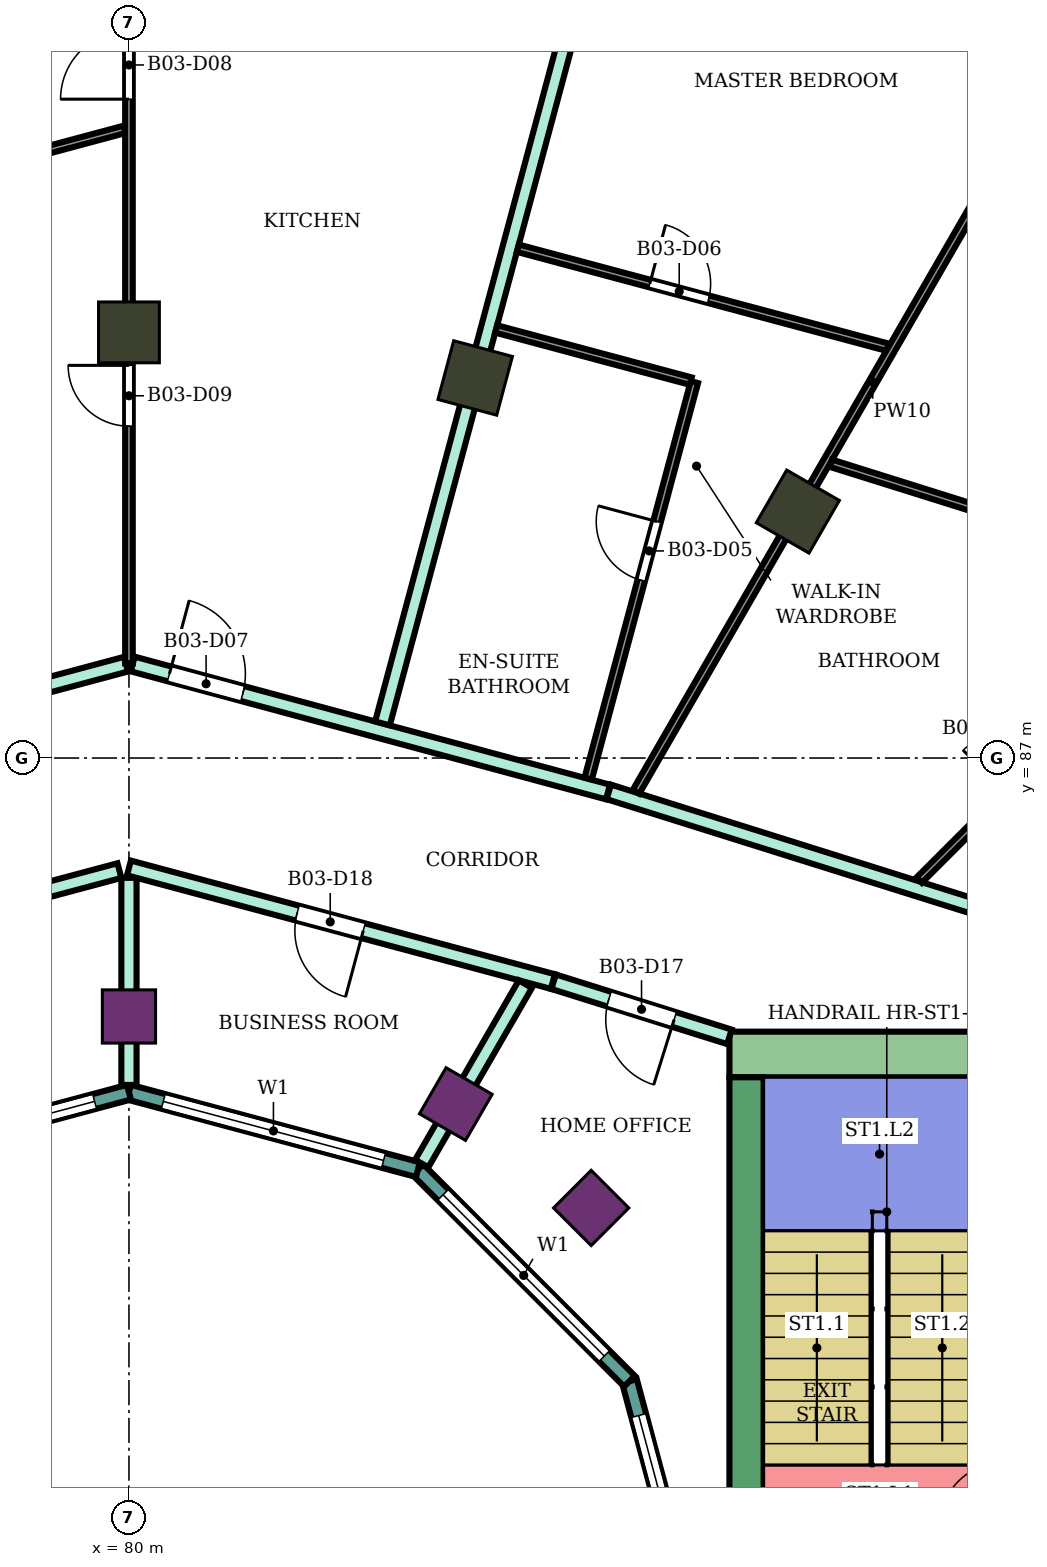
"""IFC4 building model, lengths in metres.
Left out: names, types, materials, properties, quantities, classifications, styles, units other than length and angle.
Written with IfcOpenShell. Run it as: python <this file> out.ifc"""

import sys

from ifc_helpers import new_model, si_unit, direction, frame, frame_2d, origin, origin_2d, place, context, subcontext, project, spatial, rectangle, extrude, element, fill, save


model = new_model("IFC4")
c1 = context("Model", 3, precision=1e-05, world=origin(), true_north=direction((0.0, 1.0)))
c2 = subcontext(c1, "Body", "Model", "MODEL_VIEW")
j1 = project(units=[si_unit("LENGTHUNIT", "METRE"), si_unit("PLANEANGLEUNIT", "RADIAN")], contexts=[c1])
p1 = place(None, origin())
s1 = spatial("IfcSite", under=j1, at=p1, CompositionType="ELEMENT")
p2 = place(p1, origin())
s2 = spatial("IfcBuilding", under=s1, at=p2, CompositionType="ELEMENT")
p3 = place(p2, frame((0.0, 0.0, 241.5)))
s3 = spatial("IfcBuildingStorey", under=s2, at=p3, CompositionType="ELEMENT", Elevation=241.5)
for number, where, z_axis, x_axis in (
    (1, (88.8, 90.242, 0.0), (0.0, 0.0, 1.0), (0.5, 0.866, 0.0)),
    (2, (84.555, 92.0, 0.0), (0.0, 0.0, 1.0), (0.259, 0.966, 0.0)),
    (3, (80.0, 92.6, 0.0), (0.0, 0.0, 1.0), (0.0, 1.0, 0.0)),
):
    element("IfcColumn", number, at=place(p3, frame(where, z_axis=z_axis, x_axis=x_axis)), inside=s3, PredefinedType="COLUMN", context=c2, shape_type="SweptSolid", body=[
        extrude(rectangle(XDim=0.8, YDim=0.8, at=origin_2d()), origin(), (0.0, 0.0, 1.0), 4.2),
    ])
for number, where, z_axis, x_axis in (
    (4, (86.081, 81.081, 0.0), (0.0, 0.0, 1.0), (0.707, 0.707, 0.0)),
    (5, (84.3, 82.448, 0.0), (0.0, 0.0, 1.0), (0.5, 0.866, 0.0)),
    (6, (80.0, 83.6, 0.0), (0.0, 0.0, 1.0), (0.0, 1.0, 0.0)),
):
    element("IfcColumn", number, at=place(p3, frame(where, z_axis=z_axis, x_axis=x_axis)), inside=s3, PredefinedType="COLUMN", context=c2, shape_type="SweptSolid", body=[
        extrude(rectangle(XDim=0.7, YDim=0.7, at=origin_2d()), origin(), (0.0, 0.0, 1.0), 4.2),
    ])
p4 = place(p3, frame((87.9, 83.1, 0.0), z_axis=(0.0, 0.0, 1.0), x_axis=(1.0, 0.0, 0.0)))
e7 = element("IfcWall", 7, at=p4, inside=s3, PredefinedType="SHEAR", context=c2, shape_type="SweptSolid", body=[
    extrude(rectangle(XDim=14.9, YDim=0.6, at=frame_2d((7.45, 0.0))), origin(), (0.0, 0.0, 1.0), 3.88),
])
p5 = place(p4, frame((4.2, 0.0, 0.0)))
e8 = element("IfcOpeningElement", 8, at=p5, cuts=e7, PredefinedType="OPENING", context=c2, shape_type="SweptSolid", body=[
    extrude(rectangle(XDim=2.4, YDim=2.4, at=frame_2d((1.2, 1.2))), frame((0.0, 0.31, 0.0), z_axis=(0.0, -1.0, 0.0), x_axis=(1.0, 0.0, 0.0)), (0.0, 0.0, 1.0), 0.62),
])
p6 = place(p3, frame((88.125, 75.0, 0.0), z_axis=(0.0, 0.0, 1.0), x_axis=(0.0, 1.0, 0.0)))
e9 = element("IfcWall", 9, at=p6, inside=s3, PredefinedType="SHEAR", context=c2, shape_type="SweptSolid", body=[
    extrude(rectangle(XDim=7.8, YDim=0.45, at=frame_2d((3.9, 0.0))), origin(), (0.0, 0.0, 1.0), 3.88),
])
p7 = place(p3, frame((87.604, 75.0, 0.0), z_axis=(0.0, 0.0, 1.0), x_axis=(-0.258789828301, 0.965933654434, 0.0)))
e10 = element("IfcWall", 10, at=p7, inside=s3, PredefinedType="NOTDEFINED", context=c2, shape_type="SweptSolid", body=[
    extrude(rectangle(XDim=3.936, YDim=0.2, at=frame_2d((1.968, 0.0))), origin(), (0.0, 0.0, 1.0), 4.2),
])
p8 = place(p7, frame((0.468, 0.0, 0.9)))
e11 = element("IfcOpeningElement", 11, at=p8, cuts=e10, PredefinedType="OPENING", context=c2, shape_type="SweptSolid", body=[
    extrude(rectangle(XDim=3.0, YDim=2.3, at=frame_2d((1.5, 1.15))), frame((0.0, 0.11, 0.0), z_axis=(0.0, -1.0, 0.0), x_axis=(1.0, 0.0, 0.0)), (0.0, 0.0, 1.0), 0.22),
])
p9 = place(p3, frame((86.585, 78.802, 0.0), z_axis=(0.0, 0.0, 1.0), x_axis=(-0.707106781187, 0.707106781187, 0.0)))
e12 = element("IfcWall", 12, at=p9, inside=s3, PredefinedType="NOTDEFINED", context=c2, shape_type="SweptSolid", body=[
    extrude(rectangle(XDim=3.936, YDim=0.2, at=frame_2d((1.968, 0.0))), origin(), (0.0, 0.0, 1.0), 4.2),
])
p10 = place(p9, frame((0.468, 0.0, 0.9)))
e13 = element("IfcOpeningElement", 13, at=p10, cuts=e12, PredefinedType="OPENING", context=c2, shape_type="SweptSolid", body=[
    extrude(rectangle(XDim=3.0, YDim=2.3, at=frame_2d((1.5, 1.15))), frame((0.0, 0.11, 0.0), z_axis=(0.0, -1.0, 0.0), x_axis=(1.0, 0.0, 0.0)), (0.0, 0.0, 1.0), 0.22),
])
p11 = place(p3, frame((83.802, 81.585, 0.0), z_axis=(0.0, 0.0, 1.0), x_axis=(-0.965933654434, 0.258789828301, 0.0)))
e14 = element("IfcWall", 14, at=p11, inside=s3, PredefinedType="NOTDEFINED", context=c2, shape_type="SweptSolid", body=[
    extrude(rectangle(XDim=3.936, YDim=0.2, at=frame_2d((1.968, 0.0))), origin(), (0.0, 0.0, 1.0), 4.2),
])
p12 = place(p11, frame((0.468, 0.0, 0.9)))
e15 = element("IfcOpeningElement", 15, at=p12, cuts=e14, PredefinedType="OPENING", context=c2, shape_type="SweptSolid", body=[
    extrude(rectangle(XDim=3.0, YDim=2.3, at=frame_2d((1.5, 1.15))), frame((0.0, 0.11, 0.0), z_axis=(0.0, -1.0, 0.0), x_axis=(1.0, 0.0, 0.0)), (0.0, 0.0, 1.0), 0.22),
])
p13 = place(p3, frame((80.0, 82.604, 0.0), z_axis=(0.0, 0.0, 1.0), x_axis=(-0.965933654434, -0.258789828301, 0.0)))
e16 = element("IfcWall", 16, at=p13, inside=s3, PredefinedType="NOTDEFINED", context=c2, shape_type="SweptSolid", body=[
    extrude(rectangle(XDim=3.936, YDim=0.2, at=frame_2d((1.968, 0.0))), origin(), (0.0, 0.0, 1.0), 4.2),
])
p14 = place(p13, frame((0.468, 0.0, 0.9)))
e17 = element("IfcOpeningElement", 17, at=p14, cuts=e16, PredefinedType="OPENING", context=c2, shape_type="SweptSolid", body=[
    extrude(rectangle(XDim=3.0, YDim=2.3, at=frame_2d((1.5, 1.15))), frame((0.0, 0.11, 0.0), z_axis=(0.0, -1.0, 0.0), x_axis=(1.0, 0.0, 0.0)), (0.0, 0.0, 1.0), 0.22),
])
p15 = place(p3, frame((73.687, 86.554, 0.0), z_axis=(0.0, 0.0, 1.0), x_axis=(0.96595928904, 0.258694128106, 0.0)))
e18 = element("IfcWall", 18, at=p15, inside=s3, PredefinedType="PARTITIONING", context=c2, shape_type="SweptSolid", body=[
    extrude(rectangle(XDim=6.496, YDim=0.2, at=frame_2d((3.248, 0.0))), origin(), (0.0, 0.0, 1.0), 3.75),
])
p16 = place(p15, frame((0.55, 0.0, 0.0)))
e19 = element("IfcOpeningElement", 19, at=p16, cuts=e18, PredefinedType="OPENING", context=c2, shape_type="SweptSolid", body=[
    extrude(rectangle(XDim=1.0, YDim=2.1, at=frame_2d((0.5, 1.05))), frame((0.0, 0.11, 0.0), z_axis=(0.0, -1.0, 0.0), x_axis=(1.0, 0.0, 0.0)), (0.0, 0.0, 1.0), 0.22),
])
p17 = place(p3, frame((74.413, 84.057, 0.0), z_axis=(0.0, 0.0, 1.0), x_axis=(0.965972135939, 0.258646153246, 0.0)))
e20 = element("IfcWall", 20, at=p17, inside=s3, PredefinedType="PARTITIONING", context=c2, shape_type="SweptSolid", body=[
    extrude(rectangle(XDim=5.654, YDim=0.2, at=frame_2d((2.827, 0.0))), origin(), (0.0, 0.0, 1.0), 3.75),
])
p18 = place(p17, frame((2.593, 0.0, 0.0)))
e21 = element("IfcOpeningElement", 21, at=p18, cuts=e20, PredefinedType="OPENING", context=c2, shape_type="SweptSolid", body=[
    extrude(rectangle(XDim=0.9, YDim=2.1, at=frame_2d((0.45, 1.05))), frame((0.0, 0.11, 0.0), z_axis=(0.0, -1.0, 0.0), x_axis=(1.0, 0.0, 0.0)), (0.0, 0.0, 1.0), 0.22),
])
p19 = place(p3, frame((80.0, 82.699, 0.0), z_axis=(0.0, 0.0, 1.0), x_axis=(0.0, 1.0, 0.0)))
e22 = element("IfcWall", 22, at=p19, inside=s3, PredefinedType="PARTITIONING", context=c2, shape_type="SweptSolid", body=[
    extrude(rectangle(XDim=2.725, YDim=0.2, at=frame_2d((1.363, 0.0))), origin(), (0.0, 0.0, 1.0), 3.75),
])
p20 = place(p3, frame((80.0, 85.554, 0.0), z_axis=(0.0, 0.0, 1.0), x_axis=(0.965928989968, -0.258807237802, 0.0)))
e23 = element("IfcWall", 23, at=p20, inside=s3, PredefinedType="PARTITIONING", context=c2, shape_type="SweptSolid", body=[
    extrude(rectangle(XDim=5.774, YDim=0.2, at=frame_2d((2.887, 0.0))), origin(), (0.0, 0.0, 1.0), 3.75),
])
p21 = place(p20, frame((2.292, 0.0, 0.0)))
e24 = element("IfcOpeningElement", 24, at=p21, cuts=e23, PredefinedType="OPENING", context=c2, shape_type="SweptSolid", body=[
    extrude(rectangle(XDim=0.9, YDim=2.1, at=frame_2d((0.45, 1.05))), frame((0.0, 0.11, 0.0), z_axis=(0.0, -1.0, 0.0), x_axis=(1.0, 0.0, 0.0)), (0.0, 0.0, 1.0), 0.22),
])
p22 = place(p3, frame((80.049, 88.237, 0.0), z_axis=(0.0, 0.0, 1.0), x_axis=(0.965582990495, -0.260095152718, 0.0)))
e25 = element("IfcWall", 25, at=p22, inside=s3, PredefinedType="PARTITIONING", context=c2, shape_type="SweptSolid", body=[
    extrude(rectangle(XDim=6.476, YDim=0.2, at=frame_2d((3.238, 0.0))), origin(), (0.0, 0.0, 1.0), 3.75),
])
p23 = place(p22, frame((0.5, 0.0, 0.0)))
e26 = element("IfcOpeningElement", 26, at=p23, cuts=e25, PredefinedType="OPENING", context=c2, shape_type="SweptSolid", body=[
    extrude(rectangle(XDim=1.0, YDim=2.1, at=frame_2d((0.5, 1.05))), frame((0.0, 0.11, 0.0), z_axis=(0.0, -1.0, 0.0), x_axis=(1.0, 0.0, 0.0)), (0.0, 0.0, 1.0), 0.22),
])
p24 = place(p3, frame((83.335, 87.456, 0.0), z_axis=(0.0, 0.0, 1.0), x_axis=(0.259184958139, 0.965827705895, 0.0)))
e27 = element("IfcWall", 27, at=p24, inside=s3, PredefinedType="PARTITIONING", context=c2, shape_type="SweptSolid", body=[
    extrude(rectangle(XDim=12.904, YDim=0.2, at=frame_2d((6.452, 0.0))), origin(), (0.0, 0.0, 1.0), 3.75),
])
p25 = place(p3, frame((83.852, 81.665, 0.0), z_axis=(0.0, 0.0, 1.0), x_axis=(0.500185068774, 0.865918527909, 0.0)))
e28 = element("IfcWall", 28, at=p25, inside=s3, PredefinedType="PARTITIONING", context=c2, shape_type="SweptSolid", body=[
    extrude(rectangle(XDim=2.726, YDim=0.2, at=frame_2d((1.363, 0.0))), origin(), (0.0, 0.0, 1.0), 3.75),
])
p26 = place(p3, frame((85.587, 84.057, 0.0), z_axis=(0.0, 0.0, 1.0), x_axis=(0.954239513179, -0.299043393987, 0.0)))
e29 = element("IfcWall", 29, at=p26, inside=s3, PredefinedType="PARTITIONING", context=c2, shape_type="SweptSolid", body=[
    extrude(rectangle(XDim=2.424, YDim=0.2, at=frame_2d((1.212, 0.0))), origin(), (0.0, 0.0, 1.0), 3.75),
])
p27 = place(p26, frame((0.762, 0.0, 0.0)))
e30 = element("IfcOpeningElement", 30, at=p27, cuts=e29, PredefinedType="OPENING", context=c2, shape_type="SweptSolid", body=[
    extrude(rectangle(XDim=0.9, YDim=2.1, at=frame_2d((0.45, 1.05))), frame((0.0, 0.11, 0.0), z_axis=(0.0, -1.0, 0.0), x_axis=(1.0, 0.0, 0.0)), (0.0, 0.0, 1.0), 0.22),
])
p28 = place(p3, frame((86.313, 86.554, 0.0), z_axis=(0.0, 0.0, 1.0), x_axis=(0.954081217458, -0.299548043717, 0.0)))
e31 = element("IfcWall", 31, at=p28, inside=s3, PredefinedType="PARTITIONING", context=c2, shape_type="SweptSolid", body=[
    extrude(rectangle(XDim=5.721, YDim=0.2, at=frame_2d((2.86, 0.0))), origin(), (0.0, 0.0, 1.0), 3.75),
])
p29 = place(p3, frame((75.035, 93.955, 0.0), z_axis=(0.0, 0.0, 1.0), x_axis=(0.965868648254, 0.259032342228, 0.0)))
e32 = element("IfcWall", 32, at=p29, inside=s3, PredefinedType="PARTITIONING", context=c2, shape_type="SweptSolid", body=[
    extrude(rectangle(XDim=5.08, YDim=0.1, at=frame_2d((2.54, 0.0))), origin(), (0.0, 0.0, 1.0), 3.75),
])
p30 = place(p3, frame((80.0, 88.246, 0.0), z_axis=(0.0, 0.0, 1.0), x_axis=(0.0, 1.0, 0.0)))
e33 = element("IfcWall", 33, at=p30, inside=s3, PredefinedType="PARTITIONING", context=c2, shape_type="SweptSolid", body=[
    extrude(rectangle(XDim=9.954, YDim=0.1, at=frame_2d((4.977, 0.0))), origin(), (0.0, 0.0, 1.0), 3.75),
])
p31 = place(p30, frame((7.422, 0.0, 0.0)))
e34 = element("IfcOpeningElement", 34, at=p31, cuts=e33, PredefinedType="OPENING", context=c2, shape_type="SweptSolid", body=[
    extrude(rectangle(XDim=0.9, YDim=2.1, at=frame_2d((0.45, 1.05))), frame((0.0, 0.06, 0.0), z_axis=(0.0, -1.0, 0.0), x_axis=(1.0, 0.0, 0.0)), (0.0, 0.0, 1.0), 0.12),
])
p32 = place(p30, frame((3.12, 0.0, 0.0)))
e35 = element("IfcOpeningElement", 35, at=p32, cuts=e33, PredefinedType="OPENING", context=c2, shape_type="SweptSolid", body=[
    extrude(rectangle(XDim=0.8, YDim=2.1, at=frame_2d((0.4, 1.05))), frame((0.0, 0.06, 0.0), z_axis=(0.0, -1.0, 0.0), x_axis=(1.0, 0.0, 0.0)), (0.0, 0.0, 1.0), 0.12),
])
p33 = place(p3, frame((84.831, 92.645, 0.0), z_axis=(0.0, 0.0, 1.0), x_axis=(0.965900745566, -0.258912629499, 0.0)))
e36 = element("IfcWall", 36, at=p33, inside=s3, PredefinedType="PARTITIONING", context=c2, shape_type="SweptSolid", body=[
    extrude(rectangle(XDim=2.65, YDim=0.1, at=frame_2d((1.325, 0.0))), origin(), (0.0, 0.0, 1.0), 3.75),
])
p34 = place(p3, frame((85.116, 93.707, 0.0), z_axis=(0.0, 0.0, 1.0), x_axis=(0.965979414561, -0.258618968068, 0.0)))
e37 = element("IfcWall", 37, at=p34, inside=s3, PredefinedType="PARTITIONING", context=c2, shape_type="SweptSolid", body=[
    extrude(rectangle(XDim=5.036, YDim=0.1, at=frame_2d((2.518, 0.0))), origin(), (0.0, 0.0, 1.0), 3.75),
])
p35 = place(p34, frame((1.798, 0.0, 0.0)))
e38 = element("IfcOpeningElement", 38, at=p35, cuts=e37, PredefinedType="OPENING", context=c2, shape_type="SweptSolid", body=[
    extrude(rectangle(XDim=0.8, YDim=2.1, at=frame_2d((0.4, 1.05))), frame((0.0, 0.06, 0.0), z_axis=(0.0, -1.0, 0.0), x_axis=(1.0, 0.0, 0.0)), (0.0, 0.0, 1.0), 0.12),
])
p36 = place(p3, frame((86.042, 86.731, 0.0), z_axis=(0.0, 0.0, 1.0), x_axis=(0.258737592043, 0.96594764789, 0.0)))
e39 = element("IfcWall", 39, at=p36, inside=s3, PredefinedType="PARTITIONING", context=c2, shape_type="SweptSolid", body=[
    extrude(rectangle(XDim=5.399, YDim=0.1, at=frame_2d((2.7, 0.0))), origin(), (0.0, 0.0, 1.0), 3.75),
])
p37 = place(p36, frame((2.7, 0.0, 0.0)))
e40 = element("IfcOpeningElement", 40, at=p37, cuts=e39, PredefinedType="OPENING", context=c2, shape_type="SweptSolid", body=[
    extrude(rectangle(XDim=0.8, YDim=2.1, at=frame_2d((0.4, 1.05))), frame((0.0, 0.06, 0.0), z_axis=(0.0, -1.0, 0.0), x_axis=(1.0, 0.0, 0.0)), (0.0, 0.0, 1.0), 0.12),
])
p38 = place(p3, frame((86.671, 86.554, 0.0), z_axis=(0.0, 0.0, 1.0), x_axis=(0.500104188531, 0.865965242151, 0.0)))
e41 = element("IfcWall", 41, at=p38, inside=s3, PredefinedType="PARTITIONING", context=c2, shape_type="SweptSolid", body=[
    extrude(rectangle(XDim=12.456, YDim=0.1, at=frame_2d((6.228, 0.0))), origin(), (0.0, 0.0, 1.0), 3.75),
])
p39 = place(p38, frame((9.111, 0.0, 0.0)))
e42 = element("IfcOpeningElement", 42, at=p39, cuts=e41, PredefinedType="OPENING", context=c2, shape_type="SweptSolid", body=[
    extrude(rectangle(XDim=0.9, YDim=2.1, at=frame_2d((0.45, 1.05))), frame((0.0, 0.06, 0.0), z_axis=(0.0, -1.0, 0.0), x_axis=(1.0, 0.0, 0.0)), (0.0, 0.0, 1.0), 0.12),
])
p40 = place(p3, frame((89.235, 90.878, 0.0), z_axis=(0.0, 0.0, 1.0), x_axis=(0.954193795587, -0.299189238548, 0.0)))
e43 = element("IfcWall", 43, at=p40, inside=s3, PredefinedType="PARTITIONING", context=c2, shape_type="SweptSolid", body=[
    extrude(rectangle(XDim=5.23, YDim=0.1, at=frame_2d((2.615, 0.0))), origin(), (0.0, 0.0, 1.0), 3.75),
])
p41 = place(p3, frame((90.396, 85.393, 0.0), z_axis=(0.0, 0.0, 1.0), x_axis=(0.707279106146, 0.706934414221, 0.0)))
e44 = element("IfcWall", 44, at=p41, inside=s3, PredefinedType="PARTITIONING", context=c2, shape_type="SweptSolid", body=[
    extrude(rectangle(XDim=8.5, YDim=0.1, at=frame_2d((4.25, 0.0))), origin(), (0.0, 0.0, 1.0), 3.75),
])
p42 = place(p41, frame((5.919, 0.0, 0.0)))
e45 = element("IfcOpeningElement", 45, at=p42, cuts=e44, PredefinedType="OPENING", context=c2, shape_type="SweptSolid", body=[
    extrude(rectangle(XDim=0.9, YDim=2.1, at=frame_2d((0.45, 1.05))), frame((0.0, 0.06, 0.0), z_axis=(0.0, -1.0, 0.0), x_axis=(1.0, 0.0, 0.0)), (0.0, 0.0, 1.0), 0.12),
])
p43 = place(p41, frame((1.617, 0.0, 0.0)))
e46 = element("IfcOpeningElement", 46, at=p43, cuts=e44, PredefinedType="OPENING", context=c2, shape_type="SweptSolid", body=[
    extrude(rectangle(XDim=0.8, YDim=2.1, at=frame_2d((0.4, 1.05))), frame((0.0, 0.06, 0.0), z_axis=(0.0, -1.0, 0.0), x_axis=(1.0, 0.0, 0.0)), (0.0, 0.0, 1.0), 0.12),
])
p44 = place(p8, origin())
e47 = element("IfcWindow", 47, at=p44, inside=s3, PartitioningType="SINGLE_PANEL", PredefinedType="WINDOW", context=c2, shape_type="SweptSolid", body=[
    extrude(rectangle(XDim=3.0, YDim=2.3, at=frame_2d((1.5, 1.15))), frame((0.0, 0.03, 0.0), z_axis=(0.0, -1.0, 0.0), x_axis=(1.0, 0.0, 0.0)), (0.0, 0.0, 1.0), 0.06),
])
fill(e11, e47)
p45 = place(p10, origin())
e48 = element("IfcWindow", 48, at=p45, inside=s3, PartitioningType="SINGLE_PANEL", PredefinedType="WINDOW", context=c2, shape_type="SweptSolid", body=[
    extrude(rectangle(XDim=3.0, YDim=2.3, at=frame_2d((1.5, 1.15))), frame((0.0, 0.03, 0.0), z_axis=(0.0, -1.0, 0.0), x_axis=(1.0, 0.0, 0.0)), (0.0, 0.0, 1.0), 0.06),
])
fill(e13, e48)
p46 = place(p12, origin())
e49 = element("IfcWindow", 49, at=p46, inside=s3, PartitioningType="SINGLE_PANEL", PredefinedType="WINDOW", context=c2, shape_type="SweptSolid", body=[
    extrude(rectangle(XDim=3.0, YDim=2.3, at=frame_2d((1.5, 1.15))), frame((0.0, 0.03, 0.0), z_axis=(0.0, -1.0, 0.0), x_axis=(1.0, 0.0, 0.0)), (0.0, 0.0, 1.0), 0.06),
])
fill(e15, e49)
p47 = place(p14, origin())
e50 = element("IfcWindow", 50, at=p47, inside=s3, PartitioningType="SINGLE_PANEL", PredefinedType="WINDOW", context=c2, shape_type="SweptSolid", body=[
    extrude(rectangle(XDim=3.0, YDim=2.3, at=frame_2d((1.5, 1.15))), frame((0.0, 0.03, 0.0), z_axis=(0.0, -1.0, 0.0), x_axis=(1.0, 0.0, 0.0)), (0.0, 0.0, 1.0), 0.06),
])
fill(e17, e50)
p48 = place(p37, origin())
e51 = element("IfcDoor", 51, at=p48, inside=s3, OperationType="SINGLE_SWING_RIGHT", PredefinedType="DOOR", context=c2, shape_type="SweptSolid", body=[
    extrude(rectangle(XDim=0.8, YDim=2.1, at=frame_2d((0.4, 1.05))), frame((0.0, 0.025, 0.0), z_axis=(0.0, -1.0, 0.0), x_axis=(1.0, 0.0, 0.0)), (0.0, 0.0, 1.0), 0.05),
])
fill(e40, e51)
p49 = place(p35, origin())
e52 = element("IfcDoor", 52, at=p49, inside=s3, OperationType="SINGLE_SWING_LEFT", PredefinedType="DOOR", context=c2, shape_type="SweptSolid", body=[
    extrude(rectangle(XDim=0.8, YDim=2.1, at=frame_2d((0.4, 1.05))), frame((0.0, 0.025, 0.0), z_axis=(0.0, -1.0, 0.0), x_axis=(1.0, 0.0, 0.0)), (0.0, 0.0, 1.0), 0.05),
])
fill(e38, e52)
p50 = place(p23, origin())
e53 = element("IfcDoor", 53, at=p50, inside=s3, OperationType="SINGLE_SWING_LEFT", PredefinedType="DOOR", context=c2, shape_type="SweptSolid", body=[
    extrude(rectangle(XDim=1.0, YDim=2.1, at=frame_2d((0.5, 1.05))), frame((0.0, 0.025, 0.0), z_axis=(0.0, -1.0, 0.0), x_axis=(1.0, 0.0, 0.0)), (0.0, 0.0, 1.0), 0.05),
])
fill(e26, e53)
p51 = place(p31, origin())
e54 = element("IfcDoor", 54, at=p51, inside=s3, OperationType="SINGLE_SWING_LEFT", PredefinedType="DOOR", context=c2, shape_type="SweptSolid", body=[
    extrude(rectangle(XDim=0.9, YDim=2.1, at=frame_2d((0.45, 1.05))), frame((0.0, 0.025, 0.0), z_axis=(0.0, -1.0, 0.0), x_axis=(1.0, 0.0, 0.0)), (0.0, 0.0, 1.0), 0.05),
])
fill(e34, e54)
p52 = place(p32, origin())
e55 = element("IfcDoor", 55, at=p52, inside=s3, OperationType="SINGLE_SWING_RIGHT", PredefinedType="DOOR", context=c2, shape_type="SweptSolid", body=[
    extrude(rectangle(XDim=0.8, YDim=2.1, at=frame_2d((0.4, 1.05))), frame((0.0, 0.025, 0.0), z_axis=(0.0, -1.0, 0.0), x_axis=(1.0, 0.0, 0.0)), (0.0, 0.0, 1.0), 0.05),
])
fill(e35, e55)
p53 = place(p27, frame((0.9, 0.0, 0.0), z_axis=(0.0, 0.0, 1.0), x_axis=(-1.0, 0.0, 0.0)))
e56 = element("IfcDoor", 56, at=p53, inside=s3, OperationType="SINGLE_SWING_LEFT", PredefinedType="DOOR", context=c2, shape_type="SweptSolid", body=[
    extrude(rectangle(XDim=0.9, YDim=2.1, at=frame_2d((0.45, 1.05))), frame((0.0, 0.025, 0.0), z_axis=(0.0, -1.0, 0.0), x_axis=(1.0, 0.0, 0.0)), (0.0, 0.0, 1.0), 0.05),
])
fill(e30, e56)
p54 = place(p21, frame((0.9, 0.0, 0.0), z_axis=(0.0, 0.0, 1.0), x_axis=(-1.0, 0.0, 0.0)))
e57 = element("IfcDoor", 57, at=p54, inside=s3, OperationType="SINGLE_SWING_LEFT", PredefinedType="DOOR", context=c2, shape_type="SweptSolid", body=[
    extrude(rectangle(XDim=0.9, YDim=2.1, at=frame_2d((0.45, 1.05))), frame((0.0, 0.025, 0.0), z_axis=(0.0, -1.0, 0.0), x_axis=(1.0, 0.0, 0.0)), (0.0, 0.0, 1.0), 0.05),
])
fill(e24, e57)
save(model, sys.argv[1])
